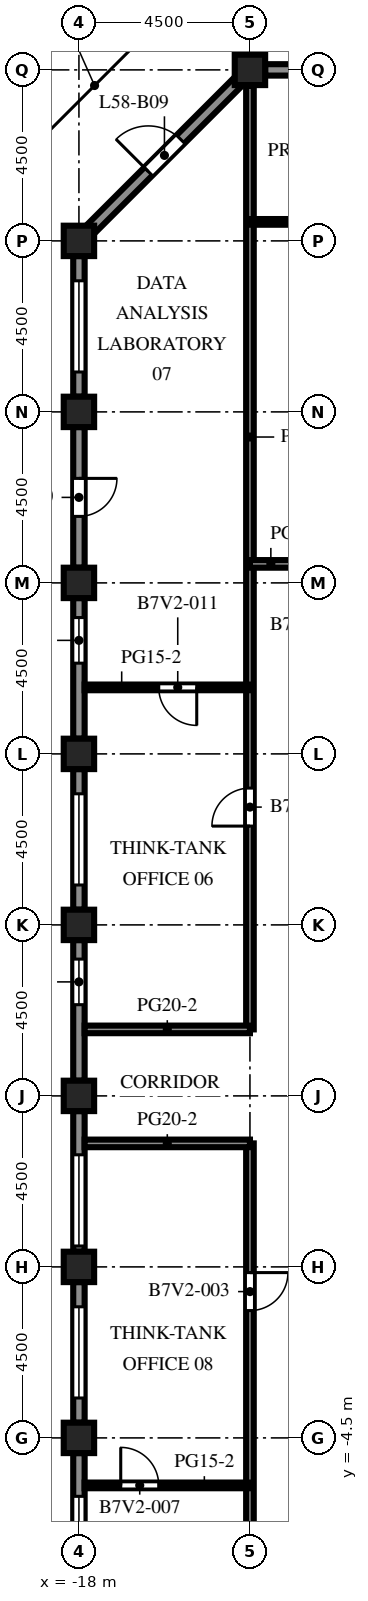
"""IFC4 building model, lengths in metres.
Left out: names, types, materials, properties, quantities, classifications, styles, units other than length and angle.
Written with IfcOpenShell. Run it as: python <this file> out.ifc"""

import sys

from ifc_helpers import new_model, si_unit, direction, frame, frame_2d, origin, origin_2d, place, context, subcontext, project, spatial, rectangle, extrude, element, fill, save


model = new_model("IFC4")
c1 = context("Model", 3, precision=1e-05, world=origin(), true_north=direction((0.0, 1.0)))
c2 = subcontext(c1, "Body", "Model", "MODEL_VIEW")
j1 = project(units=[si_unit("LENGTHUNIT", "METRE"), si_unit("PLANEANGLEUNIT", "RADIAN")], contexts=[c1])
p1 = place(None, origin())
s1 = spatial("IfcSite", under=j1, at=p1, CompositionType="ELEMENT")
p2 = place(p1, origin())
s2 = spatial("IfcBuilding", under=s1, at=p2, CompositionType="ELEMENT")
p3 = place(p2, frame((0.0, 0.0, 256.2)))
s3 = spatial("IfcBuildingStorey", under=s2, at=p3, CompositionType="ELEMENT", Elevation=256.2)
for number, where, z_axis, x_axis in (
    (1, (-18.0, -4.5, 0.0), (0.0, 0.0, 1.0), (1.0, 0.0, 0.0)),
    (2, (-18.0, 0.0, 0.0), (0.0, 0.0, 1.0), (1.0, 0.0, 0.0)),
    (3, (-18.0, 4.5, 0.0), (0.0, 0.0, 1.0), (1.0, 0.0, 0.0)),
    (4, (-18.0, 9.0, 0.0), (0.0, 0.0, 1.0), (1.0, 0.0, 0.0)),
    (5, (-18.0, 13.5, 0.0), (0.0, 0.0, 1.0), (1.0, 0.0, 0.0)),
    (6, (-18.0, 18.0, 0.0), (0.0, 0.0, 1.0), (1.0, 0.0, 0.0)),
    (7, (-18.0, 22.5, 0.0), (0.0, 0.0, 1.0), (1.0, 0.0, 0.0)),
    (8, (-18.0, 27.0, 0.0), (0.0, 0.0, 1.0), (1.0, 0.0, 0.0)),
    (9, (-13.5, 31.5, 0.0), (0.0, 0.0, 1.0), (1.0, 0.0, 0.0)),
):
    element("IfcColumn", number, at=place(p3, frame(where, z_axis=z_axis, x_axis=x_axis)), inside=s3, PredefinedType="COLUMN", context=c2, shape_type="SweptSolid", body=[
        extrude(rectangle(XDim=0.8, YDim=0.8, at=origin_2d()), origin(), (0.0, 0.0, 1.0), 4.1),
    ])
p4 = place(p3, frame((-13.1, 31.5, 0.0), z_axis=(0.0, 0.0, 1.0), x_axis=(1.0, 0.0, 0.0)))
e10 = element("IfcWall", 10, at=p4, inside=s3, PredefinedType="SOLIDWALL", context=c2, shape_type="SweptSolid", body=[
    extrude(rectangle(XDim=3.7, YDim=0.3, at=frame_2d((1.85, 0.0))), origin(), (0.0, 0.0, 1.0), 2.7),
])
p5 = place(p4, frame((0.65, 0.0, 0.8)))
e11 = element("IfcOpeningElement", 11, at=p5, cuts=e10, PredefinedType="OPENING", context=c2, shape_type="SweptSolid", body=[
    extrude(rectangle(XDim=2.4, YDim=1.7, at=frame_2d((1.2, 0.85))), frame((0.0, 0.16, 0.0), z_axis=(0.0, -1.0, 0.0), x_axis=(1.0, 0.0, 0.0)), (0.0, 0.0, 1.0), 0.32),
])
p6 = place(p3, frame((-17.706, 27.294, 0.0), z_axis=(0.0, 0.0, 1.0), x_axis=(0.707106781187, 0.707106781187, 0.0)))
e12 = element("IfcWall", 12, at=p6, inside=s3, PredefinedType="SOLIDWALL", context=c2, shape_type="SweptSolid", body=[
    extrude(rectangle(XDim=5.532, YDim=0.3, at=frame_2d((2.766, 0.0))), origin(), (0.0, 0.0, 1.0), 2.7),
])
p7 = place(p6, frame((2.166, 0.0, 0.0)))
e13 = element("IfcOpeningElement", 13, at=p7, cuts=e12, PredefinedType="OPENING", context=c2, shape_type="SweptSolid", body=[
    extrude(rectangle(XDim=1.2, YDim=2.2, at=frame_2d((0.6, 1.1))), frame((0.0, 0.16, 0.0), z_axis=(0.0, -1.0, 0.0), x_axis=(1.0, 0.0, 0.0)), (0.0, 0.0, 1.0), 0.32),
])
p8 = place(p3, frame((-18.0, 22.9, 0.0), z_axis=(0.0, 0.0, 1.0), x_axis=(0.0, 1.0, 0.0)))
e14 = element("IfcWall", 14, at=p8, inside=s3, PredefinedType="SOLIDWALL", context=c2, shape_type="SweptSolid", body=[
    extrude(rectangle(XDim=3.7, YDim=0.3, at=frame_2d((1.85, 0.0))), origin(), (0.0, 0.0, 1.0), 2.7),
])
p9 = place(p8, frame((0.65, 0.0, 0.8)))
e15 = element("IfcOpeningElement", 15, at=p9, cuts=e14, PredefinedType="OPENING", context=c2, shape_type="SweptSolid", body=[
    extrude(rectangle(XDim=2.4, YDim=1.7, at=frame_2d((1.2, 0.85))), frame((0.0, 0.16, 0.0), z_axis=(0.0, -1.0, 0.0), x_axis=(1.0, 0.0, 0.0)), (0.0, 0.0, 1.0), 0.32),
])
p10 = place(p3, frame((-18.0, 18.4, 0.0), z_axis=(0.0, 0.0, 1.0), x_axis=(0.0, 1.0, 0.0)))
e16 = element("IfcWall", 16, at=p10, inside=s3, PredefinedType="SOLIDWALL", context=c2, shape_type="SweptSolid", body=[
    extrude(rectangle(XDim=3.7, YDim=0.3, at=frame_2d((1.85, 0.0))), origin(), (0.0, 0.0, 1.0), 2.7),
])
p11 = place(p10, frame((1.35, 0.0, 0.0)))
e17 = element("IfcOpeningElement", 17, at=p11, cuts=e16, PredefinedType="OPENING", context=c2, shape_type="SweptSolid", body=[
    extrude(rectangle(XDim=1.0, YDim=2.2, at=frame_2d((0.5, 1.1))), frame((0.0, 0.16, 0.0), z_axis=(0.0, -1.0, 0.0), x_axis=(1.0, 0.0, 0.0)), (0.0, 0.0, 1.0), 0.32),
])
p12 = place(p3, frame((-18.0, 13.9, 0.0), z_axis=(0.0, 0.0, 1.0), x_axis=(0.0, 1.0, 0.0)))
e18 = element("IfcWall", 18, at=p12, inside=s3, PredefinedType="SOLIDWALL", context=c2, shape_type="SweptSolid", body=[
    extrude(rectangle(XDim=3.7, YDim=0.3, at=frame_2d((1.85, 0.0))), origin(), (0.0, 0.0, 1.0), 2.7),
])
p13 = place(p12, frame((1.988, 0.0, 0.8)))
e19 = element("IfcOpeningElement", 19, at=p13, cuts=e18, PredefinedType="OPENING", context=c2, shape_type="SweptSolid", body=[
    extrude(rectangle(XDim=1.2, YDim=1.7, at=frame_2d((0.6, 0.85))), frame((0.0, 0.16, 0.0), z_axis=(0.0, -1.0, 0.0), x_axis=(1.0, 0.0, 0.0)), (0.0, 0.0, 1.0), 0.32),
])
p14 = place(p3, frame((-18.0, 9.4, 0.0), z_axis=(0.0, 0.0, 1.0), x_axis=(0.0, 1.0, 0.0)))
e20 = element("IfcWall", 20, at=p14, inside=s3, PredefinedType="SOLIDWALL", context=c2, shape_type="SweptSolid", body=[
    extrude(rectangle(XDim=3.7, YDim=0.3, at=frame_2d((1.85, 0.0))), origin(), (0.0, 0.0, 1.0), 2.7),
])
p15 = place(p14, frame((0.65, 0.0, 0.8)))
e21 = element("IfcOpeningElement", 21, at=p15, cuts=e20, PredefinedType="OPENING", context=c2, shape_type="SweptSolid", body=[
    extrude(rectangle(XDim=2.4, YDim=1.7, at=frame_2d((1.2, 0.85))), frame((0.0, 0.16, 0.0), z_axis=(0.0, -1.0, 0.0), x_axis=(1.0, 0.0, 0.0)), (0.0, 0.0, 1.0), 0.32),
])
p16 = place(p3, frame((-18.0, 4.9, 0.0), z_axis=(0.0, 0.0, 1.0), x_axis=(0.0, 1.0, 0.0)))
e22 = element("IfcWall", 22, at=p16, inside=s3, PredefinedType="SOLIDWALL", context=c2, shape_type="SweptSolid", body=[
    extrude(rectangle(XDim=3.7, YDim=0.3, at=frame_2d((1.85, 0.0))), origin(), (0.0, 0.0, 1.0), 2.7),
])
p17 = place(p16, frame((2.0, 0.0, 0.8)))
e23 = element("IfcOpeningElement", 23, at=p17, cuts=e22, PredefinedType="OPENING", context=c2, shape_type="SweptSolid", body=[
    extrude(rectangle(XDim=1.2, YDim=1.7, at=frame_2d((0.6, 0.85))), frame((0.0, 0.16, 0.0), z_axis=(0.0, -1.0, 0.0), x_axis=(1.0, 0.0, 0.0)), (0.0, 0.0, 1.0), 0.32),
])
p18 = place(p3, frame((-18.0, 0.4, 0.0), z_axis=(0.0, 0.0, 1.0), x_axis=(0.0, 1.0, 0.0)))
e24 = element("IfcWall", 24, at=p18, inside=s3, PredefinedType="SOLIDWALL", context=c2, shape_type="SweptSolid", body=[
    extrude(rectangle(XDim=3.7, YDim=0.3, at=frame_2d((1.85, 0.0))), origin(), (0.0, 0.0, 1.0), 2.7),
])
p19 = place(p18, frame((0.15, 0.0, 0.8)))
e25 = element("IfcOpeningElement", 25, at=p19, cuts=e24, PredefinedType="OPENING", context=c2, shape_type="SweptSolid", body=[
    extrude(rectangle(XDim=2.4, YDim=1.7, at=frame_2d((1.2, 0.85))), frame((0.0, 0.16, 0.0), z_axis=(0.0, -1.0, 0.0), x_axis=(1.0, 0.0, 0.0)), (0.0, 0.0, 1.0), 0.32),
])
p20 = place(p3, frame((-18.0, -4.1, 0.0), z_axis=(0.0, 0.0, 1.0), x_axis=(0.0, 1.0, 0.0)))
e26 = element("IfcWall", 26, at=p20, inside=s3, PredefinedType="SOLIDWALL", context=c2, shape_type="SweptSolid", body=[
    extrude(rectangle(XDim=3.7, YDim=0.3, at=frame_2d((1.85, 0.0))), origin(), (0.0, 0.0, 1.0), 2.7),
])
p21 = place(p20, frame((0.65, 0.0, 0.8)))
e27 = element("IfcOpeningElement", 27, at=p21, cuts=e26, PredefinedType="OPENING", context=c2, shape_type="SweptSolid", body=[
    extrude(rectangle(XDim=2.4, YDim=1.7, at=frame_2d((1.2, 0.85))), frame((0.0, 0.16, 0.0), z_axis=(0.0, -1.0, 0.0), x_axis=(1.0, 0.0, 0.0)), (0.0, 0.0, 1.0), 0.32),
])
p22 = place(p3, frame((-18.0, -8.6, 0.0), z_axis=(0.0, 0.0, 1.0), x_axis=(0.0, 1.0, 0.0)))
e28 = element("IfcWall", 28, at=p22, inside=s3, PredefinedType="SOLIDWALL", context=c2, shape_type="SweptSolid", body=[
    extrude(rectangle(XDim=3.7, YDim=0.3, at=frame_2d((1.85, 0.0))), origin(), (0.0, 0.0, 1.0), 2.7),
])
p23 = place(p22, frame((0.163, 0.0, 0.8)))
e29 = element("IfcOpeningElement", 29, at=p23, cuts=e28, PredefinedType="OPENING", context=c2, shape_type="SweptSolid", body=[
    extrude(rectangle(XDim=2.4, YDim=1.7, at=frame_2d((1.2, 0.85))), frame((0.0, 0.16, 0.0), z_axis=(0.0, -1.0, 0.0), x_axis=(1.0, 0.0, 0.0)), (0.0, 0.0, 1.0), 0.32),
])
p24 = place(p3, frame((-13.5, -22.077, 0.0), z_axis=(0.0, 0.0, 1.0), x_axis=(0.0, 1.0, 0.0)))
e30 = element("IfcWall", 30, at=p24, inside=s3, PredefinedType="PARTITIONING", context=c2, shape_type="SweptSolid", body=[
    extrude(rectangle(XDim=25.327, YDim=0.2, at=frame_2d((12.664, 0.0))), origin(), (0.0, 0.0, 1.0), 3.5),
])
p25 = place(p24, frame((20.927, 0.0, 0.0)))
e31 = element("IfcOpeningElement", 31, at=p25, cuts=e30, PredefinedType="OPENING", context=c2, shape_type="SweptSolid", body=[
    extrude(rectangle(XDim=1.0, YDim=2.1, at=frame_2d((0.5, 1.05))), frame((0.0, 0.11, 0.0), z_axis=(0.0, -1.0, 0.0), x_axis=(1.0, 0.0, 0.0)), (0.0, 0.0, 1.0), 0.22),
])
p26 = place(p3, frame((-13.5, 6.25, 0.0), z_axis=(0.0, 0.0, 1.0), x_axis=(0.0, 1.0, 0.0)))
e32 = element("IfcWall", 32, at=p26, inside=s3, PredefinedType="PARTITIONING", context=c2, shape_type="SweptSolid", body=[
    extrude(rectangle(XDim=24.827, YDim=0.2, at=frame_2d((12.414, 0.0))), origin(), (0.0, 0.0, 1.0), 3.5),
])
p27 = place(p26, frame((5.35, 0.0, 0.0)))
e33 = element("IfcOpeningElement", 33, at=p27, cuts=e32, PredefinedType="OPENING", context=c2, shape_type="SweptSolid", body=[
    extrude(rectangle(XDim=1.0, YDim=2.1, at=frame_2d((0.5, 1.05))), frame((0.0, 0.11, 0.0), z_axis=(0.0, -1.0, 0.0), x_axis=(1.0, 0.0, 0.0)), (0.0, 0.0, 1.0), 0.22),
])
p28 = place(p3, frame((-13.5, -5.75, 0.0), z_axis=(0.0, 0.0, 1.0), x_axis=(-1.0, 0.0, 0.0)))
e34 = element("IfcWall", 34, at=p28, inside=s3, PredefinedType="PARTITIONING", context=c2, shape_type="SweptSolid", body=[
    extrude(rectangle(XDim=4.35, YDim=0.15, at=frame_2d((2.175, 0.0))), origin(), (0.0, 0.0, 1.0), 3.5),
])
p29 = place(p28, frame((2.4, 0.0, 0.0)))
e35 = element("IfcOpeningElement", 35, at=p29, cuts=e34, PredefinedType="OPENING", context=c2, shape_type="SweptSolid", body=[
    extrude(rectangle(XDim=1.0, YDim=2.1, at=frame_2d((0.5, 1.05))), frame((0.0, 0.085, 0.0), z_axis=(0.0, -1.0, 0.0), x_axis=(1.0, 0.0, 0.0)), (0.0, 0.0, 1.0), 0.17),
])
for number, where, z_axis, x_axis in (
    (36, (-17.85, 3.25, 0.0), (0.0, 0.0, 1.0), (1.0, 0.0, 0.0)),
    (37, (-17.85, 6.25, 0.0), (0.0, 0.0, 1.0), (1.0, 0.0, 0.0)),
):
    element("IfcWall", number, at=place(p3, frame(where, z_axis=z_axis, x_axis=x_axis)), inside=s3, PredefinedType="PARTITIONING", context=c2, shape_type="SweptSolid", body=[
        extrude(rectangle(XDim=4.35, YDim=0.2, at=frame_2d((2.175, 0.0))), origin(), (0.0, 0.0, 1.0), 3.5),
    ])
p30 = place(p3, frame((-17.85, 15.25, 0.0), z_axis=(0.0, 0.0, 1.0), x_axis=(1.0, 0.0, 0.0)))
e38 = element("IfcWall", 38, at=p30, inside=s3, PredefinedType="PARTITIONING", context=c2, shape_type="SweptSolid", body=[
    extrude(rectangle(XDim=4.35, YDim=0.15, at=frame_2d((2.175, 0.0))), origin(), (0.0, 0.0, 1.0), 3.5),
])
p31 = place(p30, frame((1.95, 0.0, 0.0)))
e39 = element("IfcOpeningElement", 39, at=p31, cuts=e38, PredefinedType="OPENING", context=c2, shape_type="SweptSolid", body=[
    extrude(rectangle(XDim=1.0, YDim=2.1, at=frame_2d((0.5, 1.05))), frame((0.0, 0.085, 0.0), z_axis=(0.0, -1.0, 0.0), x_axis=(1.0, 0.0, 0.0)), (0.0, 0.0, 1.0), 0.17),
])
p32 = place(p3, frame((-13.5, 18.5, 0.0), z_axis=(0.0, 0.0, 1.0), x_axis=(1.0, 0.0, 0.0)))
e40 = element("IfcWall", 40, at=p32, inside=s3, PredefinedType="PARTITIONING", context=c2, shape_type="SweptSolid", body=[
    extrude(rectangle(XDim=3.0, YDim=0.2, at=frame_2d((1.5, 0.0))), origin(), (0.0, 0.0, 1.0), 3.5),
])
p33 = place(p32, frame((1.1, 0.0, 0.0)))
e41 = element("IfcOpeningElement", 41, at=p33, cuts=e40, PredefinedType="OPENING", context=c2, shape_type="SweptSolid", body=[
    extrude(rectangle(XDim=1.0, YDim=2.1, at=frame_2d((0.5, 1.05))), frame((0.0, 0.11, 0.0), z_axis=(0.0, -1.0, 0.0), x_axis=(1.0, 0.0, 0.0)), (0.0, 0.0, 1.0), 0.22),
])
p34 = place(p3, frame((-13.5, 27.5, 0.0), z_axis=(0.0, 0.0, 1.0), x_axis=(1.0, 0.0, 0.0)))
e42 = element("IfcWall", 42, at=p34, inside=s3, PredefinedType="PARTITIONING", context=c2, shape_type="SweptSolid", body=[
    extrude(rectangle(XDim=4.0, YDim=0.15, at=frame_2d((2.0, 0.0))), origin(), (0.0, 0.0, 1.0), 3.5),
])
p35 = place(p7, origin())
e43 = element("IfcDoor", 43, at=p35, inside=s3, OperationType="SINGLE_SWING_LEFT", PredefinedType="DOOR", context=c2, shape_type="SweptSolid", body=[
    extrude(rectangle(XDim=1.2, YDim=2.2, at=frame_2d((0.6, 1.1))), frame((0.0, 0.025, 0.0), z_axis=(0.0, -1.0, 0.0), x_axis=(1.0, 0.0, 0.0)), (0.0, 0.0, 1.0), 0.05),
])
fill(e13, e43)
p36 = place(p9, origin())
e44 = element("IfcWindow", 44, at=p36, inside=s3, PartitioningType="SINGLE_PANEL", PredefinedType="WINDOW", context=c2, shape_type="SweptSolid", body=[
    extrude(rectangle(XDim=2.4, YDim=1.7, at=frame_2d((1.2, 0.85))), frame((0.0, 0.03, 0.0), z_axis=(0.0, -1.0, 0.0), x_axis=(1.0, 0.0, 0.0)), (0.0, 0.0, 1.0), 0.06),
])
fill(e15, e44)
p37 = place(p11, origin())
e45 = element("IfcDoor", 45, at=p37, inside=s3, OperationType="SINGLE_SWING_RIGHT", PredefinedType="DOOR", context=c2, shape_type="SweptSolid", body=[
    extrude(rectangle(XDim=1.0, YDim=2.2, at=frame_2d((0.5, 1.1))), frame((0.0, 0.025, 0.0), z_axis=(0.0, -1.0, 0.0), x_axis=(1.0, 0.0, 0.0)), (0.0, 0.0, 1.0), 0.05),
])
fill(e17, e45)
p38 = place(p13, origin())
e46 = element("IfcWindow", 46, at=p38, inside=s3, PartitioningType="SINGLE_PANEL", PredefinedType="WINDOW", context=c2, shape_type="SweptSolid", body=[
    extrude(rectangle(XDim=1.2, YDim=1.7, at=frame_2d((0.6, 0.85))), frame((0.0, 0.03, 0.0), z_axis=(0.0, -1.0, 0.0), x_axis=(1.0, 0.0, 0.0)), (0.0, 0.0, 1.0), 0.06),
])
fill(e19, e46)
p39 = place(p15, origin())
e47 = element("IfcWindow", 47, at=p39, inside=s3, PartitioningType="SINGLE_PANEL", PredefinedType="WINDOW", context=c2, shape_type="SweptSolid", body=[
    extrude(rectangle(XDim=2.4, YDim=1.7, at=frame_2d((1.2, 0.85))), frame((0.0, 0.03, 0.0), z_axis=(0.0, -1.0, 0.0), x_axis=(1.0, 0.0, 0.0)), (0.0, 0.0, 1.0), 0.06),
])
fill(e21, e47)
p40 = place(p17, origin())
e48 = element("IfcWindow", 48, at=p40, inside=s3, PartitioningType="SINGLE_PANEL", PredefinedType="WINDOW", context=c2, shape_type="SweptSolid", body=[
    extrude(rectangle(XDim=1.2, YDim=1.7, at=frame_2d((0.6, 0.85))), frame((0.0, 0.03, 0.0), z_axis=(0.0, -1.0, 0.0), x_axis=(1.0, 0.0, 0.0)), (0.0, 0.0, 1.0), 0.06),
])
fill(e23, e48)
p41 = place(p19, origin())
e49 = element("IfcWindow", 49, at=p41, inside=s3, PartitioningType="SINGLE_PANEL", PredefinedType="WINDOW", context=c2, shape_type="SweptSolid", body=[
    extrude(rectangle(XDim=2.4, YDim=1.7, at=frame_2d((1.2, 0.85))), frame((0.0, 0.03, 0.0), z_axis=(0.0, -1.0, 0.0), x_axis=(1.0, 0.0, 0.0)), (0.0, 0.0, 1.0), 0.06),
])
fill(e25, e49)
p42 = place(p21, origin())
e50 = element("IfcWindow", 50, at=p42, inside=s3, PartitioningType="SINGLE_PANEL", PredefinedType="WINDOW", context=c2, shape_type="SweptSolid", body=[
    extrude(rectangle(XDim=2.4, YDim=1.7, at=frame_2d((1.2, 0.85))), frame((0.0, 0.03, 0.0), z_axis=(0.0, -1.0, 0.0), x_axis=(1.0, 0.0, 0.0)), (0.0, 0.0, 1.0), 0.06),
])
fill(e27, e50)
p43 = place(p23, origin())
e51 = element("IfcWindow", 51, at=p43, inside=s3, PartitioningType="SINGLE_PANEL", PredefinedType="WINDOW", context=c2, shape_type="SweptSolid", body=[
    extrude(rectangle(XDim=2.4, YDim=1.7, at=frame_2d((1.2, 0.85))), frame((0.0, 0.03, 0.0), z_axis=(0.0, -1.0, 0.0), x_axis=(1.0, 0.0, 0.0)), (0.0, 0.0, 1.0), 0.06),
])
fill(e29, e51)
p44 = place(p25, origin())
e52 = element("IfcDoor", 52, at=p44, inside=s3, OperationType="SINGLE_SWING_RIGHT", PredefinedType="DOOR", context=c2, shape_type="SweptSolid", body=[
    extrude(rectangle(XDim=1.0, YDim=2.1, at=frame_2d((0.5, 1.05))), frame((0.0, 0.025, 0.0), z_axis=(0.0, -1.0, 0.0), x_axis=(1.0, 0.0, 0.0)), (0.0, 0.0, 1.0), 0.05),
])
fill(e31, e52)
p45 = place(p27, origin())
e53 = element("IfcDoor", 53, at=p45, inside=s3, OperationType="SINGLE_SWING_LEFT", PredefinedType="DOOR", context=c2, shape_type="SweptSolid", body=[
    extrude(rectangle(XDim=1.0, YDim=2.1, at=frame_2d((0.5, 1.05))), frame((0.0, 0.025, 0.0), z_axis=(0.0, -1.0, 0.0), x_axis=(1.0, 0.0, 0.0)), (0.0, 0.0, 1.0), 0.05),
])
fill(e33, e53)
p46 = place(p29, origin())
e54 = element("IfcDoor", 54, at=p46, inside=s3, OperationType="SINGLE_SWING_RIGHT", PredefinedType="DOOR", context=c2, shape_type="SweptSolid", body=[
    extrude(rectangle(XDim=1.0, YDim=2.1, at=frame_2d((0.5, 1.05))), frame((0.0, 0.025, 0.0), z_axis=(0.0, -1.0, 0.0), x_axis=(1.0, 0.0, 0.0)), (0.0, 0.0, 1.0), 0.05),
])
fill(e35, e54)
p47 = place(p31, origin())
e55 = element("IfcDoor", 55, at=p47, inside=s3, OperationType="SINGLE_SWING_RIGHT", PredefinedType="DOOR", context=c2, shape_type="SweptSolid", body=[
    extrude(rectangle(XDim=1.0, YDim=2.1, at=frame_2d((0.5, 1.05))), frame((0.0, 0.025, 0.0), z_axis=(0.0, -1.0, 0.0), x_axis=(1.0, 0.0, 0.0)), (0.0, 0.0, 1.0), 0.05),
])
fill(e39, e55)
save(model, sys.argv[1])
